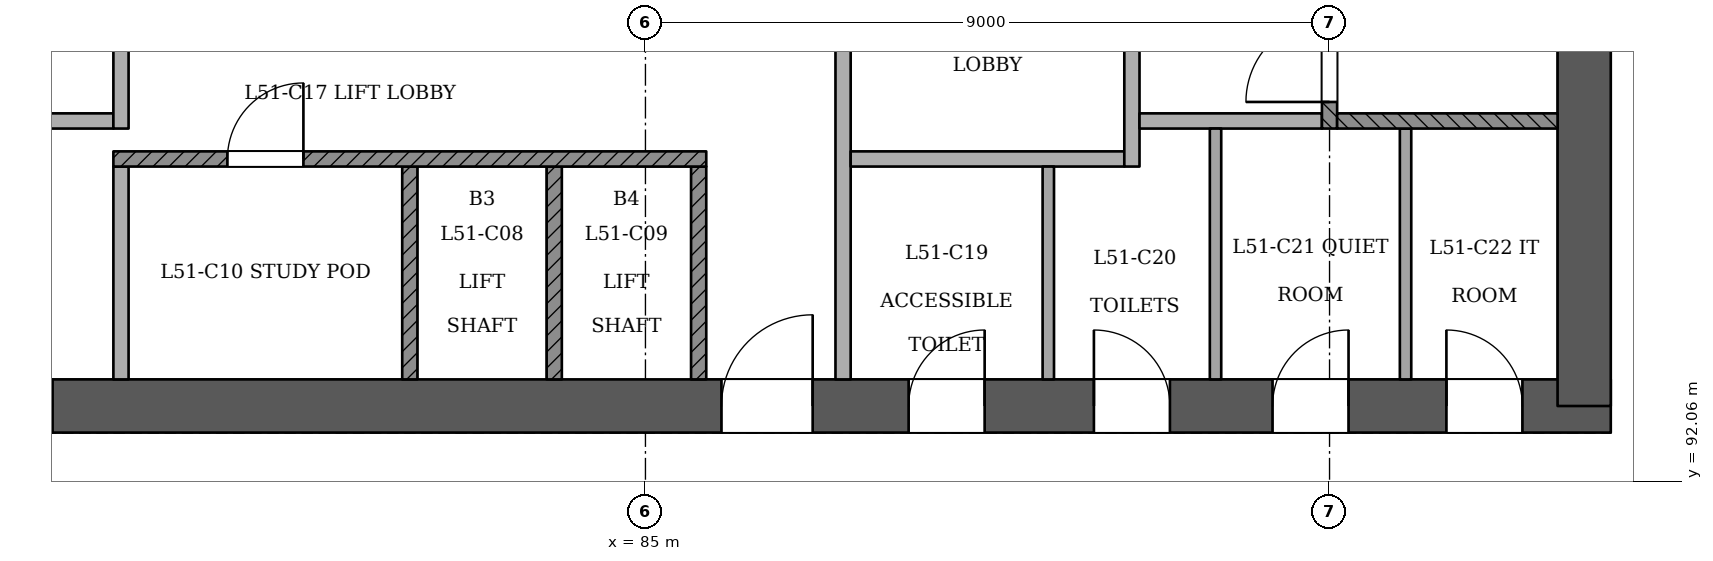
"""IFC4 building model, lengths in metres.
Left out: names, types, materials, properties, quantities, classifications, styles, units other than length and angle.
Written with IfcOpenShell. Run it as: python <this file> out.ifc"""

import sys

from ifc_helpers import new_model, si_unit, direction, frame, frame_2d, origin, place, context, subcontext, project, spatial, rectangle, extrude, element, fill, save


model = new_model("IFC4")
c1 = context("Model", 3, precision=1e-05, world=origin(), true_north=direction((0.0, 1.0)))
c2 = subcontext(c1, "Body", "Model", "MODEL_VIEW")
j1 = project(units=[si_unit("LENGTHUNIT", "METRE"), si_unit("PLANEANGLEUNIT", "RADIAN")], contexts=[c1])
p1 = place(None, origin())
s1 = spatial("IfcSite", under=j1, at=p1, CompositionType="ELEMENT")
p2 = place(p1, origin())
s2 = spatial("IfcBuilding", under=s1, at=p2, CompositionType="ELEMENT")
p3 = place(p2, frame((0.0, 0.0, 198.0)))
s3 = spatial("IfcBuildingStorey", under=s2, at=p3, CompositionType="ELEMENT", Elevation=198.0)
p4 = place(p3, frame((72.65, 93.05, 0.0), z_axis=(0.0, 0.0, 1.0), x_axis=(1.0, 0.0, 0.0)))
e1 = element("IfcWall", 1, at=p4, inside=s3, PredefinedType="SHEAR", context=c2, shape_type="SweptSolid", body=[
    extrude(rectangle(XDim=25.05, YDim=0.7, at=frame_2d((12.525, 0.0))), origin(), (0.0, 0.0, 1.0), 3.6),
])
p5 = place(p4, frame((1.15, 0.0, 0.0)))
e2 = element("IfcOpeningElement", 2, at=p5, cuts=e1, PredefinedType="OPENING", context=c2, shape_type="SweptSolid", body=[
    extrude(rectangle(XDim=1.2, YDim=2.1, at=frame_2d((0.6, 1.05))), frame((0.0, 0.36, 0.0), z_axis=(0.0, -1.0, 0.0), x_axis=(1.0, 0.0, 0.0)), (0.0, 0.0, 1.0), 0.721),
])
p6 = place(p4, frame((3.35, 0.0, 0.0)))
e3 = element("IfcOpeningElement", 3, at=p6, cuts=e1, PredefinedType="OPENING", context=c2, shape_type="SweptSolid", body=[
    extrude(rectangle(XDim=1.2, YDim=2.1, at=frame_2d((0.6, 1.05))), frame((0.0, 0.36, 0.0), z_axis=(0.0, -1.0, 0.0), x_axis=(1.0, 0.0, 0.0)), (0.0, 0.0, 1.0), 0.721),
])
p7 = place(p4, frame((13.35, 0.0, 0.0)))
e4 = element("IfcOpeningElement", 4, at=p7, cuts=e1, PredefinedType="OPENING", context=c2, shape_type="SweptSolid", body=[
    extrude(rectangle(XDim=1.2, YDim=2.1, at=frame_2d((0.6, 1.05))), frame((0.0, 0.36, 0.0), z_axis=(0.0, -1.0, 0.0), x_axis=(1.0, 0.0, 0.0)), (0.0, 0.0, 1.0), 0.721),
])
p8 = place(p4, frame((15.812, 0.0, 0.0)))
e5 = element("IfcOpeningElement", 5, at=p8, cuts=e1, PredefinedType="OPENING", context=c2, shape_type="SweptSolid", body=[
    extrude(rectangle(XDim=1.0, YDim=2.1, at=frame_2d((0.5, 1.05))), frame((0.0, 0.36, 0.0), z_axis=(0.0, -1.0, 0.0), x_axis=(1.0, 0.0, 0.0)), (0.0, 0.0, 1.0), 0.721),
])
p9 = place(p4, frame((18.25, 0.0, 0.0)))
e6 = element("IfcOpeningElement", 6, at=p9, cuts=e1, PredefinedType="OPENING", context=c2, shape_type="SweptSolid", body=[
    extrude(rectangle(XDim=1.0, YDim=2.1, at=frame_2d((0.5, 1.05))), frame((0.0, 0.36, 0.0), z_axis=(0.0, -1.0, 0.0), x_axis=(1.0, 0.0, 0.0)), (0.0, 0.0, 1.0), 0.721),
])
p10 = place(p4, frame((20.6, 0.0, 0.0)))
e7 = element("IfcOpeningElement", 7, at=p10, cuts=e1, PredefinedType="OPENING", context=c2, shape_type="SweptSolid", body=[
    extrude(rectangle(XDim=1.0, YDim=2.1, at=frame_2d((0.5, 1.05))), frame((0.0, 0.36, 0.0), z_axis=(0.0, -1.0, 0.0), x_axis=(1.0, 0.0, 0.0)), (0.0, 0.0, 1.0), 0.721),
])
p11 = place(p4, frame((22.887, 0.0, 0.0)))
e8 = element("IfcOpeningElement", 8, at=p11, cuts=e1, PredefinedType="OPENING", context=c2, shape_type="SweptSolid", body=[
    extrude(rectangle(XDim=1.0, YDim=2.1, at=frame_2d((0.5, 1.05))), frame((0.0, 0.36, 0.0), z_axis=(0.0, -1.0, 0.0), x_axis=(1.0, 0.0, 0.0)), (0.0, 0.0, 1.0), 0.721),
])
p12 = place(p3, frame((97.35, 93.05, 0.0), z_axis=(0.0, 0.0, 1.0), x_axis=(0.0, 1.0, 0.0)))
e9 = element("IfcWall", 9, at=p12, inside=s3, PredefinedType="SHEAR", context=c2, shape_type="SweptSolid", body=[
    extrude(rectangle(XDim=11.05, YDim=0.7, at=frame_2d((5.525, 0.0))), origin(), (0.0, 0.0, 1.0), 3.6),
])
p13 = place(p3, frame((78.1, 93.4, 0.0), z_axis=(0.0, 0.0, 1.0), x_axis=(0.0, 1.0, 0.0)))
e10 = element("IfcWall", 10, at=p13, inside=s3, PredefinedType="PARTITIONING", context=c2, shape_type="SweptSolid", body=[
    extrude(rectangle(XDim=2.8, YDim=0.2, at=frame_2d((1.4, 0.0))), origin(), (0.0, 0.0, 1.0), 3.15),
])
for number, where, z_axis, x_axis in (
    (11, (81.9, 93.4, 0.0), (0.0, 0.0, 1.0), (0.0, 1.0, 0.0)),
    (12, (83.8, 93.4, 0.0), (0.0, 0.0, 1.0), (0.0, 1.0, 0.0)),
    (13, (85.7, 93.4, 0.0), (0.0, 0.0, 1.0), (0.0, 1.0, 0.0)),
):
    element("IfcWall", number, at=place(p3, frame(where, z_axis=z_axis, x_axis=x_axis)), inside=s3, PredefinedType="SOLIDWALL", context=c2, shape_type="SweptSolid", body=[
        extrude(rectangle(XDim=2.8, YDim=0.2, at=frame_2d((1.4, 0.0))), origin(), (0.0, 0.0, 1.0), 3.15),
    ])
p14 = place(p3, frame((87.6, 93.4, 0.0), z_axis=(0.0, 0.0, 1.0), x_axis=(0.0, 1.0, 0.0)))
e14 = element("IfcWall", 14, at=p14, inside=s3, PredefinedType="PARTITIONING", context=c2, shape_type="SweptSolid", body=[
    extrude(rectangle(XDim=7.0, YDim=0.2, at=frame_2d((3.5, 0.0))), origin(), (0.0, 0.0, 1.0), 3.15),
])
p15 = place(p14, frame((4.45, 0.0, 0.0)))
e15 = element("IfcOpeningElement", 15, at=p15, cuts=e14, PredefinedType="OPENING", context=c2, shape_type="SweptSolid", body=[
    extrude(rectangle(XDim=1.1, YDim=2.1, at=frame_2d((0.55, 1.05))), frame((0.0, 0.11, 0.0), z_axis=(0.0, -1.0, 0.0), x_axis=(1.0, 0.0, 0.0)), (0.0, 0.0, 1.0), 0.221),
])
p16 = place(p3, frame((90.3, 93.4, 0.0), z_axis=(0.0, 0.0, 1.0), x_axis=(0.0, 1.0, 0.0)))
e16 = element("IfcWall", 16, at=p16, inside=s3, PredefinedType="PARTITIONING", context=c2, shape_type="SweptSolid", body=[
    extrude(rectangle(XDim=2.8, YDim=0.15, at=frame_2d((1.4, 0.0))), origin(), (0.0, 0.0, 1.0), 3.15),
])
for number, where, z_axis, x_axis in (
    (17, (92.5, 93.4, 0.0), (0.0, 0.0, 1.0), (0.0, 1.0, 0.0)),
    (18, (95.0, 93.4, 0.0), (0.0, 0.0, 1.0), (0.0, 1.0, 0.0)),
):
    element("IfcWall", number, at=place(p3, frame(where, z_axis=z_axis, x_axis=x_axis)), inside=s3, PredefinedType="PARTITIONING", context=c2, shape_type="SweptSolid", body=[
        extrude(rectangle(XDim=3.3, YDim=0.15, at=frame_2d((1.65, 0.0))), origin(), (0.0, 0.0, 1.0), 3.15),
    ])
p17 = place(p3, frame((78.0, 96.3, 0.0), z_axis=(0.0, 0.0, 1.0), x_axis=(1.0, 0.0, 0.0)))
e19 = element("IfcWall", 19, at=p17, inside=s3, PredefinedType="SOLIDWALL", context=c2, shape_type="SweptSolid", body=[
    extrude(rectangle(XDim=7.8, YDim=0.2, at=frame_2d((3.9, 0.0))), origin(), (0.0, 0.0, 1.0), 3.15),
])
p18 = place(p17, frame((1.5, 0.0, 0.0)))
e20 = element("IfcOpeningElement", 20, at=p18, cuts=e19, PredefinedType="OPENING", context=c2, shape_type="SweptSolid", body=[
    extrude(rectangle(XDim=1.0, YDim=2.1, at=frame_2d((0.5, 1.05))), frame((0.0, 0.11, 0.0), z_axis=(0.0, -1.0, 0.0), x_axis=(1.0, 0.0, 0.0)), (0.0, 0.0, 1.0), 0.221),
])
p19 = place(p3, frame((87.7, 96.3, 0.0), z_axis=(0.0, 0.0, 1.0), x_axis=(1.0, 0.0, 0.0)))
e21 = element("IfcWall", 21, at=p19, inside=s3, PredefinedType="PARTITIONING", context=c2, shape_type="SweptSolid", body=[
    extrude(rectangle(XDim=3.6, YDim=0.2, at=frame_2d((1.8, 0.0))), origin(), (0.0, 0.0, 1.0), 3.15),
])
p20 = place(p3, frame((91.4, 96.2, 0.0), z_axis=(0.0, 0.0, 1.0), x_axis=(0.0, 1.0, 0.0)))
e22 = element("IfcWall", 22, at=p20, inside=s3, PredefinedType="PARTITIONING", context=c2, shape_type="SweptSolid", body=[
    extrude(rectangle(XDim=4.2, YDim=0.2, at=frame_2d((2.1, 0.0))), origin(), (0.0, 0.0, 1.0), 3.15),
])
p21 = place(p20, frame((2.45, 0.0, 0.0)))
e23 = element("IfcOpeningElement", 23, at=p21, cuts=e22, PredefinedType="OPENING", context=c2, shape_type="SweptSolid", body=[
    extrude(rectangle(XDim=1.1, YDim=2.1, at=frame_2d((0.55, 1.05))), frame((0.0, 0.11, 0.0), z_axis=(0.0, -1.0, 0.0), x_axis=(1.0, 0.0, 0.0)), (0.0, 0.0, 1.0), 0.221),
])
p22 = place(p3, frame((76.1, 96.8, 0.0), z_axis=(0.0, 0.0, 1.0), x_axis=(1.0, 0.0, 0.0)))
e24 = element("IfcWall", 24, at=p22, inside=s3, PredefinedType="PARTITIONING", context=c2, shape_type="SweptSolid", body=[
    extrude(rectangle(XDim=1.9, YDim=0.2, at=frame_2d((0.95, 0.0))), origin(), (0.0, 0.0, 1.0), 3.15),
])
p23 = place(p3, frame((78.1, 96.7, 0.0), z_axis=(0.0, 0.0, 1.0), x_axis=(0.0, 1.0, 0.0)))
e25 = element("IfcWall", 25, at=p23, inside=s3, PredefinedType="PARTITIONING", context=c2, shape_type="SweptSolid", body=[
    extrude(rectangle(XDim=3.7, YDim=0.2, at=frame_2d((1.85, 0.0))), origin(), (0.0, 0.0, 1.0), 3.15),
])
p24 = place(p23, frame((1.95, 0.0, 0.0)))
e26 = element("IfcOpeningElement", 26, at=p24, cuts=e25, PredefinedType="OPENING", context=c2, shape_type="SweptSolid", body=[
    extrude(rectangle(XDim=1.1, YDim=2.1, at=frame_2d((0.55, 1.05))), frame((0.0, 0.11, 0.0), z_axis=(0.0, -1.0, 0.0), x_axis=(1.0, 0.0, 0.0)), (0.0, 0.0, 1.0), 0.221),
])
p25 = place(p3, frame((91.5, 96.8, 0.0), z_axis=(0.0, 0.0, 1.0), x_axis=(1.0, 0.0, 0.0)))
e27 = element("IfcWall", 27, at=p25, inside=s3, PredefinedType="PARTITIONING", context=c2, shape_type="SweptSolid", body=[
    extrude(rectangle(XDim=2.4, YDim=0.2, at=frame_2d((1.2, 0.0))), origin(), (0.0, 0.0, 1.0), 3.15),
])
p26 = place(p3, frame((94.0, 96.7, 0.0), z_axis=(0.0, 0.0, 1.0), x_axis=(0.0, 1.0, 0.0)))
e28 = element("IfcWall", 28, at=p26, inside=s3, PredefinedType="SOLIDWALL", context=c2, shape_type="SweptSolid", body=[
    extrude(rectangle(XDim=3.7, YDim=0.2, at=frame_2d((1.85, 0.0))), origin(), (0.0, 0.0, 1.0), 3.15),
])
p27 = place(p26, frame((0.35, 0.0, 0.0)))
e29 = element("IfcOpeningElement", 29, at=p27, cuts=e28, PredefinedType="OPENING", context=c2, shape_type="SweptSolid", body=[
    extrude(rectangle(XDim=1.1, YDim=2.1, at=frame_2d((0.55, 1.05))), frame((0.0, 0.11, 0.0), z_axis=(0.0, -1.0, 0.0), x_axis=(1.0, 0.0, 0.0)), (0.0, 0.0, 1.0), 0.221),
])
p28 = place(p3, frame((94.1, 96.8, 0.0), z_axis=(0.0, 0.0, 1.0), x_axis=(1.0, 0.0, 0.0)))
e30 = element("IfcWall", 30, at=p28, inside=s3, PredefinedType="SOLIDWALL", context=c2, shape_type="SweptSolid", body=[
    extrude(rectangle(XDim=2.9, YDim=0.2, at=frame_2d((1.45, 0.0))), origin(), (0.0, 0.0, 1.0), 3.15),
])
p29 = place(p27, origin())
e31 = element("IfcDoor", 31, at=p29, inside=s3, OperationType="SINGLE_SWING_LEFT", PredefinedType="NOTDEFINED", context=c2, shape_type="SweptSolid", body=[
    extrude(rectangle(XDim=1.1, YDim=2.1, at=frame_2d((0.55, 1.05))), frame((0.0, 0.025, 0.0), z_axis=(0.0, -1.0, 0.0), x_axis=(1.0, 0.0, 0.0)), (0.0, 0.0, 1.0), 0.05),
])
fill(e29, e31)
p30 = place(p6, origin())
e32 = element("IfcDoor", 32, at=p30, inside=s3, OperationType="SINGLE_SWING_LEFT", PredefinedType="NOTDEFINED", context=c2, shape_type="SweptSolid", body=[
    extrude(rectangle(XDim=1.2, YDim=2.1, at=frame_2d((0.6, 1.05))), frame((0.0, 0.025, 0.0), z_axis=(0.0, -1.0, 0.0), x_axis=(1.0, 0.0, 0.0)), (0.0, 0.0, 1.0), 0.05),
])
fill(e3, e32)
p31 = place(p7, origin())
e33 = element("IfcDoor", 33, at=p31, inside=s3, OperationType="SINGLE_SWING_RIGHT", PredefinedType="NOTDEFINED", context=c2, shape_type="SweptSolid", body=[
    extrude(rectangle(XDim=1.2, YDim=2.1, at=frame_2d((0.6, 1.05))), frame((0.0, 0.025, 0.0), z_axis=(0.0, -1.0, 0.0), x_axis=(1.0, 0.0, 0.0)), (0.0, 0.0, 1.0), 0.05),
])
fill(e4, e33)
p32 = place(p8, origin())
e34 = element("IfcDoor", 34, at=p32, inside=s3, OperationType="SINGLE_SWING_RIGHT", PredefinedType="NOTDEFINED", context=c2, shape_type="SweptSolid", body=[
    extrude(rectangle(XDim=1.0, YDim=2.1, at=frame_2d((0.5, 1.05))), frame((0.0, 0.025, 0.0), z_axis=(0.0, -1.0, 0.0), x_axis=(1.0, 0.0, 0.0)), (0.0, 0.0, 1.0), 0.05),
])
fill(e5, e34)
p33 = place(p9, origin())
e35 = element("IfcDoor", 35, at=p33, inside=s3, OperationType="SINGLE_SWING_LEFT", PredefinedType="NOTDEFINED", context=c2, shape_type="SweptSolid", body=[
    extrude(rectangle(XDim=1.0, YDim=2.1, at=frame_2d((0.5, 1.05))), frame((0.0, 0.025, 0.0), z_axis=(0.0, -1.0, 0.0), x_axis=(1.0, 0.0, 0.0)), (0.0, 0.0, 1.0), 0.05),
])
fill(e6, e35)
p34 = place(p10, origin())
e36 = element("IfcDoor", 36, at=p34, inside=s3, OperationType="SINGLE_SWING_RIGHT", PredefinedType="NOTDEFINED", context=c2, shape_type="SweptSolid", body=[
    extrude(rectangle(XDim=1.0, YDim=2.1, at=frame_2d((0.5, 1.05))), frame((0.0, 0.025, 0.0), z_axis=(0.0, -1.0, 0.0), x_axis=(1.0, 0.0, 0.0)), (0.0, 0.0, 1.0), 0.05),
])
fill(e7, e36)
p35 = place(p11, origin())
e37 = element("IfcDoor", 37, at=p35, inside=s3, OperationType="SINGLE_SWING_LEFT", PredefinedType="NOTDEFINED", context=c2, shape_type="SweptSolid", body=[
    extrude(rectangle(XDim=1.0, YDim=2.1, at=frame_2d((0.5, 1.05))), frame((0.0, 0.025, 0.0), z_axis=(0.0, -1.0, 0.0), x_axis=(1.0, 0.0, 0.0)), (0.0, 0.0, 1.0), 0.05),
])
fill(e8, e37)
p36 = place(p18, origin())
e38 = element("IfcDoor", 38, at=p36, inside=s3, OperationType="SINGLE_SWING_RIGHT", PredefinedType="NOTDEFINED", context=c2, shape_type="SweptSolid", body=[
    extrude(rectangle(XDim=1.0, YDim=2.1, at=frame_2d((0.5, 1.05))), frame((0.0, 0.025, 0.0), z_axis=(0.0, -1.0, 0.0), x_axis=(1.0, 0.0, 0.0)), (0.0, 0.0, 1.0), 0.05),
])
fill(e20, e38)
save(model, sys.argv[1])
